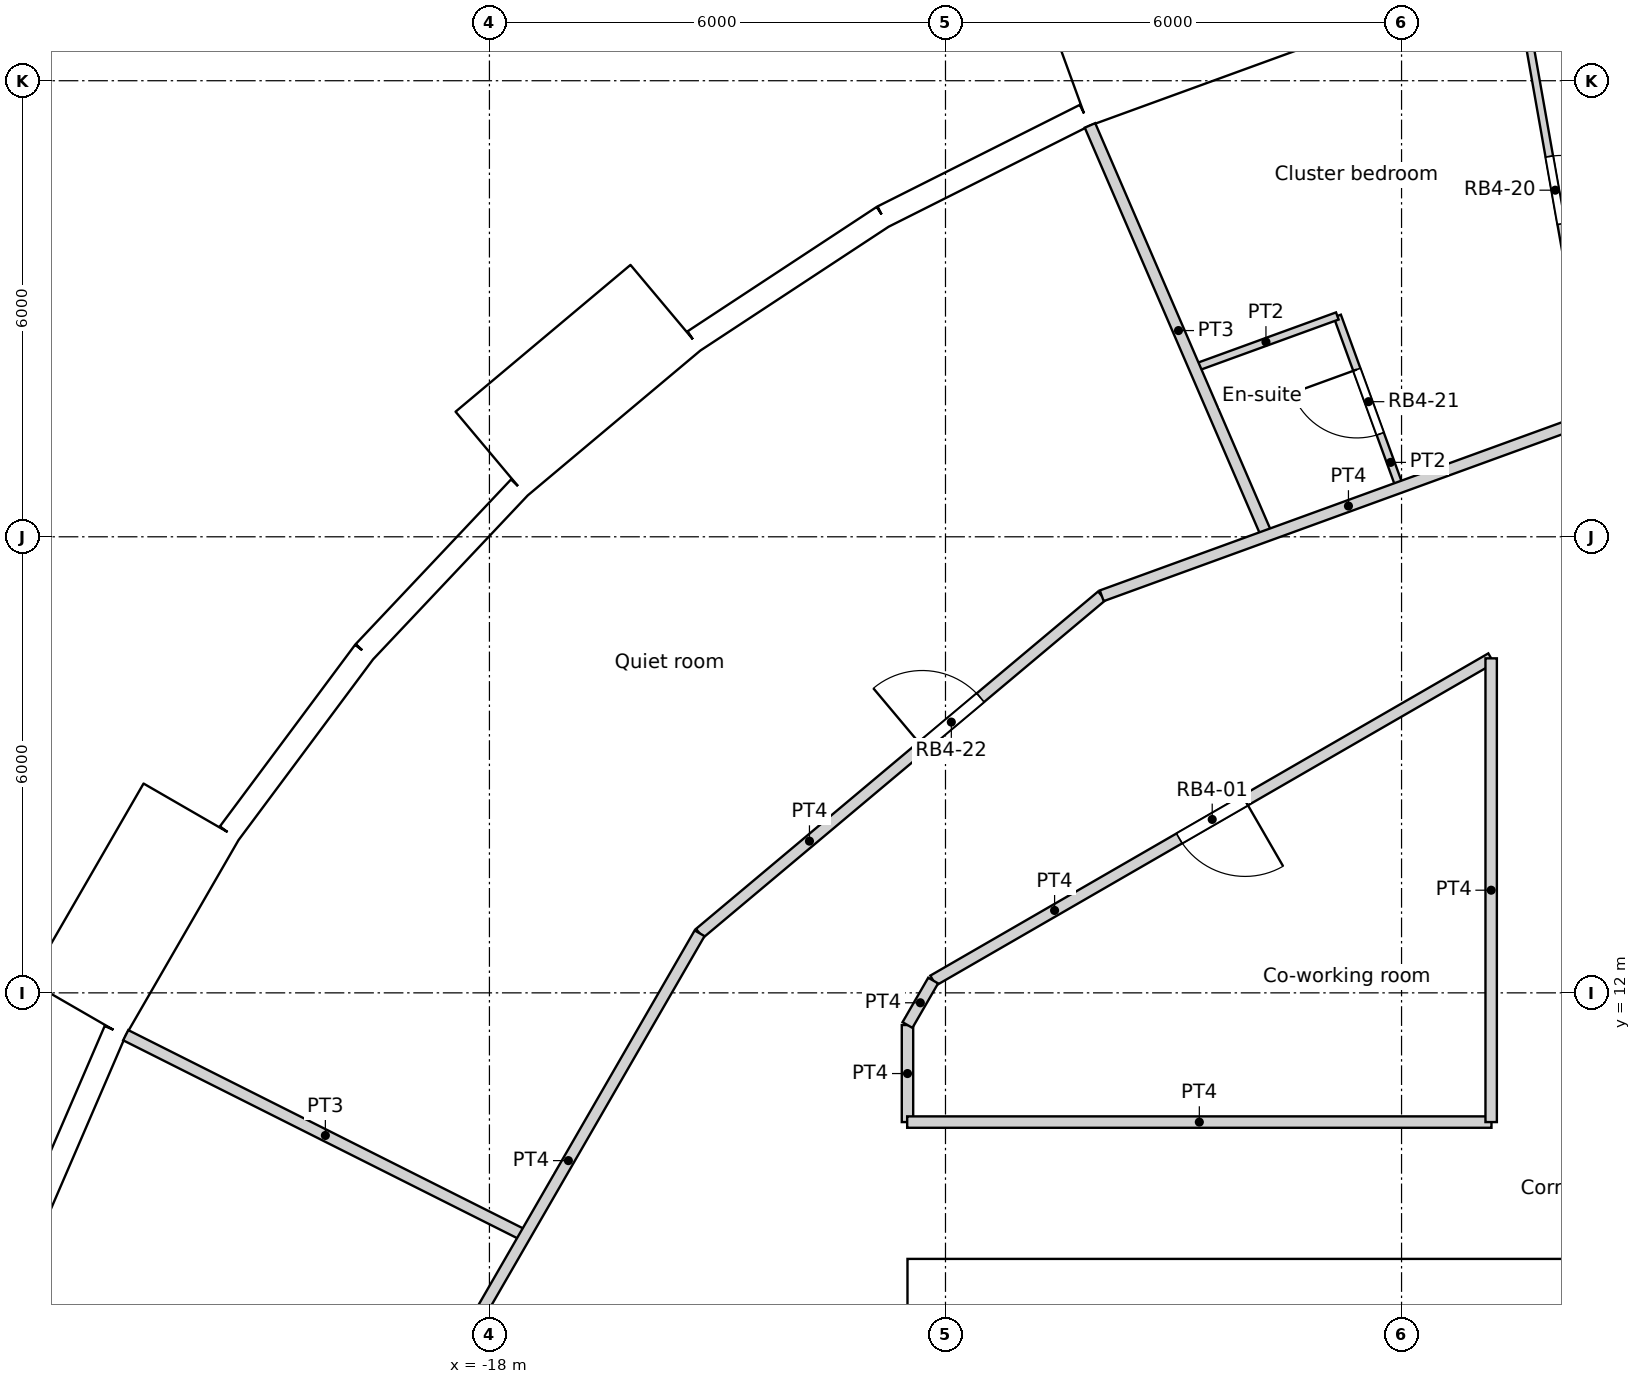
"""IFC4 building model, lengths in metres.
Left out: names, types, materials, properties, quantities, classifications, styles, units other than length and angle.
Written with IfcOpenShell. Run it as: python <this file> out.ifc"""

import sys

from ifc_helpers import new_model, si_unit, direction, frame, frame_2d, origin, origin_2d, place, context, subcontext, project, spatial, rectangle, circle, extrude, element, fill, save


model = new_model("IFC4")
c1 = context("Model", 3, precision=1e-05, world=origin(), true_north=direction((0.0, 1.0)))
c2 = subcontext(c1, "Body", "Model", "MODEL_VIEW")
j1 = project(units=[si_unit("LENGTHUNIT", "METRE"), si_unit("PLANEANGLEUNIT", "RADIAN")], contexts=[c1])
p1 = place(None, origin())
s1 = spatial("IfcSite", under=j1, at=p1, CompositionType="ELEMENT")
p2 = place(p1, origin())
s2 = spatial("IfcBuilding", under=s1, at=p2, CompositionType="ELEMENT")
p3 = place(p2, frame((0.0, 0.0, 158.4)))
s3 = spatial("IfcBuildingStorey", under=s2, at=p3, CompositionType="ELEMENT", Elevation=158.4)
for number, where, z_axis, x_axis in (
    (1, (-7.04, 23.516, 0.0), (0.0, 0.0, 1.0), (1.0, 0.0, 0.0)),
    (2, (-12.274, 21.259, 0.0), (0.0, 0.0, 1.0), (1.0, 0.0, 0.0)),
    (3, (-16.846, 17.855, 0.0), (0.0, 0.0, 1.0), (1.0, 0.0, 0.0)),
    (4, (-20.509, 13.489, 0.0), (0.0, 0.0, 1.0), (1.0, 0.0, 0.0)),
    (5, (-23.067, 8.396, 0.0), (0.0, 0.0, 1.0), (1.0, 0.0, 0.0)),
):
    element("IfcColumn", number, at=place(p3, frame(where, z_axis=z_axis, x_axis=x_axis)), inside=s3, PredefinedType="COLUMN", context=c2, shape_type="SweptSolid", body=[
        extrude(circle(Radius=0.6, at=origin_2d()), origin(), (0.0, 0.0, 1.0), 3.6),
    ])
for number, where, z_axis, x_axis in (
    (6, (-4.188, 18.35, 0.0), (0.0, 0.0, 1.0), (1.0, 0.0, 0.0)),
    (7, (-9.411, 16.301, 0.0), (0.0, 0.0, 1.0), (1.0, 0.0, 0.0)),
    (8, (-13.798, 12.802, 0.0), (0.0, 0.0, 1.0), (1.0, 0.0, 0.0)),
    (9, (-16.958, 8.167, 0.0), (0.0, 0.0, 1.0), (1.0, 0.0, 0.0)),
):
    element("IfcColumn", number, at=place(p3, frame(where, z_axis=z_axis, x_axis=x_axis)), inside=s3, PredefinedType="COLUMN", context=c2, shape_type="SweptSolid", body=[
        extrude(circle(Radius=0.65, at=origin_2d()), origin(), (0.0, 0.0, 1.0), 3.6),
    ])
p4 = place(p3, frame((-7.544, 25.113, -0.3), z_axis=(0.0, 0.0, 1.0), x_axis=(-0.939686455819, -0.342037080957, 0.0)))
e10 = element("IfcWall", 10, at=p4, inside=s3, PredefinedType="ELEMENTEDWALL", context=c2, shape_type="SweptSolid", body=[
    extrude(rectangle(XDim=3.0, YDim=1.45, at=frame_2d((1.5, 0.0))), origin(), (0.0, 0.0, 1.0), 3.6),
])
p5 = place(p4, frame((1.5, 0.0, 1.85)))
e11 = element("IfcOpeningElement", 11, at=p5, cuts=e10, PredefinedType="OPENING", context=c2, shape_type="SweptSolid", body=[
    extrude(circle(Radius=0.9, at=origin_2d()), frame((0.0, 0.735, 0.0), z_axis=(0.0, -1.0, 0.0), x_axis=(1.0, 0.0, 0.0)), (0.0, 0.0, 1.0), 1.47),
])
p6 = place(p3, frame((-10.167, 23.546, 0.0), z_axis=(0.0, 0.0, 1.0), x_axis=(-0.893637442555, -0.448789618045, 0.0)))
e12 = element("IfcWall", 12, at=p6, inside=s3, PredefinedType="SOLIDWALL", context=c2, shape_type="SweptSolid", body=[
    extrude(rectangle(XDim=2.973, YDim=0.3, at=frame_2d((1.486, 0.0))), origin(), (0.0, 0.0, 1.0), 3.3),
])
p7 = place(p6, frame((1.486, 0.0, 1.55)))
e13 = element("IfcOpeningElement", 13, at=p7, cuts=e12, PredefinedType="OPENING", context=c2, shape_type="SweptSolid", body=[
    extrude(circle(Radius=0.9, at=origin_2d()), frame((0.0, 0.16, 0.0), z_axis=(0.0, -1.0, 0.0), x_axis=(1.0, 0.0, 0.0)), (0.0, 0.0, 1.0), 0.32),
])
p8 = place(p3, frame((-12.824, 22.211, 0.0), z_axis=(0.0, 0.0, 1.0), x_axis=(-0.835470659512, -0.549535055382, 0.0)))
e14 = element("IfcWall", 14, at=p8, inside=s3, PredefinedType="SOLIDWALL", context=c2, shape_type="SweptSolid", body=[
    extrude(rectangle(XDim=2.973, YDim=0.3, at=frame_2d((1.487, 0.0))), origin(), (0.0, 0.0, 1.0), 3.3),
])
p9 = place(p8, frame((1.486, 0.0, 1.55)))
e15 = element("IfcOpeningElement", 15, at=p9, cuts=e14, PredefinedType="OPENING", context=c2, shape_type="SweptSolid", body=[
    extrude(circle(Radius=0.9, at=origin_2d()), frame((0.0, 0.16, 0.0), z_axis=(0.0, -1.0, 0.0), x_axis=(1.0, 0.0, 0.0)), (0.0, 0.0, 1.0), 0.32),
])
p10 = place(p3, frame((-15.678, 21.019, -0.3), z_axis=(0.0, 0.0, 1.0), x_axis=(-0.766022196139, -0.642814121673, 0.0)))
e16 = element("IfcWall", 16, at=p10, inside=s3, PredefinedType="ELEMENTEDWALL", context=c2, shape_type="SweptSolid", body=[
    extrude(rectangle(XDim=3.0, YDim=1.45, at=frame_2d((1.5, 0.0))), origin(), (0.0, 0.0, 1.0), 3.6),
])
p11 = place(p10, frame((1.5, 0.0, 1.85)))
e17 = element("IfcOpeningElement", 17, at=p11, cuts=e16, PredefinedType="OPENING", context=c2, shape_type="SweptSolid", body=[
    extrude(circle(Radius=0.9, at=origin_2d()), frame((0.0, 0.735, 0.0), z_axis=(0.0, -1.0, 0.0), x_axis=(1.0, 0.0, 0.0)), (0.0, 0.0, 1.0), 1.47),
])
p12 = place(p3, frame((-17.607, 18.648, 0.0), z_axis=(0.0, 0.0, 1.0), x_axis=(-0.686235184166, -0.727379730273, 0.0)))
e18 = element("IfcWall", 18, at=p12, inside=s3, PredefinedType="SOLIDWALL", context=c2, shape_type="SweptSolid", body=[
    extrude(rectangle(XDim=2.973, YDim=0.3, at=frame_2d((1.486, 0.0))), origin(), (0.0, 0.0, 1.0), 3.3),
])
p13 = place(p12, frame((1.486, 0.0, 1.55)))
e19 = element("IfcOpeningElement", 19, at=p13, cuts=e18, PredefinedType="OPENING", context=c2, shape_type="SweptSolid", body=[
    extrude(circle(Radius=0.9, at=origin_2d()), frame((0.0, 0.16, 0.0), z_axis=(0.0, -1.0, 0.0), x_axis=(1.0, 0.0, 0.0)), (0.0, 0.0, 1.0), 0.32),
])
p14 = place(p3, frame((-19.647, 16.486, 0.0), z_axis=(0.0, 0.0, 1.0), x_axis=(-0.597197580538, -0.80209416517, 0.0)))
e20 = element("IfcWall", 20, at=p14, inside=s3, PredefinedType="SOLIDWALL", context=c2, shape_type="SweptSolid", body=[
    extrude(rectangle(XDim=2.973, YDim=0.3, at=frame_2d((1.486, 0.0))), origin(), (0.0, 0.0, 1.0), 3.3),
])
p15 = place(p14, frame((1.486, 0.0, 1.55)))
e21 = element("IfcOpeningElement", 21, at=p15, cuts=e20, PredefinedType="OPENING", context=c2, shape_type="SweptSolid", body=[
    extrude(circle(Radius=0.9, at=origin_2d()), frame((0.0, 0.16, 0.0), z_axis=(0.0, -1.0, 0.0), x_axis=(1.0, 0.0, 0.0)), (0.0, 0.0, 1.0), 0.32),
])
p16 = place(p3, frame((-21.922, 14.389, -0.3), z_axis=(0.0, 0.0, 1.0), x_axis=(-0.499990139034, -0.866031096941, 0.0)))
e22 = element("IfcWall", 22, at=p16, inside=s3, PredefinedType="ELEMENTEDWALL", context=c2, shape_type="SweptSolid", body=[
    extrude(rectangle(XDim=3.0, YDim=1.45, at=frame_2d((1.5, 0.0))), origin(), (0.0, 0.0, 1.0), 3.6),
])
p17 = place(p16, frame((1.5, 0.0, 1.85)))
e23 = element("IfcOpeningElement", 23, at=p17, cuts=e22, PredefinedType="OPENING", context=c2, shape_type="SweptSolid", body=[
    extrude(circle(Radius=0.9, at=origin_2d()), frame((0.0, 0.735, 0.0), z_axis=(0.0, -1.0, 0.0), x_axis=(1.0, 0.0, 0.0)), (0.0, 0.0, 1.0), 1.47),
])
p18 = place(p3, frame((-22.923, 11.502, 0.0), z_axis=(0.0, 0.0, 1.0), x_axis=(-0.396148129016, -0.918186614952, 0.0)))
e24 = element("IfcWall", 24, at=p18, inside=s3, PredefinedType="SOLIDWALL", context=c2, shape_type="SweptSolid", body=[
    extrude(rectangle(XDim=2.973, YDim=0.3, at=frame_2d((1.486, 0.0))), origin(), (0.0, 0.0, 1.0), 3.3),
])
p19 = place(p18, frame((1.486, 0.0, 1.55)))
e25 = element("IfcOpeningElement", 25, at=p19, cuts=e24, PredefinedType="OPENING", context=c2, shape_type="SweptSolid", body=[
    extrude(circle(Radius=0.9, at=origin_2d()), frame((0.0, 0.16, 0.0), z_axis=(0.0, -1.0, 0.0), x_axis=(1.0, 0.0, 0.0)), (0.0, 0.0, 1.0), 0.32),
])
p20 = place(p3, frame((-12.5, 8.05, 0.0), z_axis=(0.0, 0.0, 1.0), x_axis=(1.0, 0.0, 0.0)))
e26 = element("IfcWall", 26, at=p20, inside=s3, PredefinedType="SOLIDWALL", context=c2, shape_type="SweptSolid", body=[
    extrude(rectangle(XDim=25.0, YDim=0.9, at=frame_2d((12.5, 0.0))), origin(), (0.0, 0.0, 1.0), 3.6),
])
p21 = place(p20, frame((8.3, 0.0, 0.0)))
e27 = element("IfcOpeningElement", 27, at=p21, cuts=e26, PredefinedType="OPENING", context=c2, shape_type="SweptSolid", body=[
    extrude(rectangle(XDim=1.8, YDim=2.1, at=frame_2d((0.9, 1.05))), frame((0.0, 0.45, 0.0), z_axis=(0.0, -1.0, 0.0), x_axis=(1.0, 0.0, 0.0)), (0.0, 0.0, 1.0), 0.9),
])
p22 = place(p3, frame((-12.504, 10.3, 0.0), z_axis=(0.0, 0.0, 1.0), x_axis=(1.0, 0.0, 0.0)))
e28 = element("IfcWall", 28, at=p22, inside=s3, PredefinedType="PARTITIONING", context=c2, shape_type="SweptSolid", body=[
    extrude(rectangle(XDim=7.687, YDim=0.15, at=frame_2d((3.844, 0.0))), origin(), (0.0, 0.0, 1.0), 3.3),
])
p23 = place(p3, frame((-4.821, 10.3, 0.0), z_axis=(0.0, 0.0, 1.0), x_axis=(0.0, 1.0, 0.0)))
e29 = element("IfcWall", 29, at=p23, inside=s3, PredefinedType="PARTITIONING", context=c2, shape_type="SweptSolid", body=[
    extrude(rectangle(XDim=6.101, YDim=0.15, at=frame_2d((3.05, 0.0))), origin(), (0.0, 0.0, 1.0), 3.3),
])
p24 = place(p3, frame((-12.162, 12.162, 0.0), z_axis=(0.0, 0.0, 1.0), x_axis=(0.866004766557, 0.500035743023, 0.0)))
e30 = element("IfcWall", 30, at=p24, inside=s3, PredefinedType="PARTITIONING", context=c2, shape_type="SweptSolid", body=[
    extrude(rectangle(XDim=8.477, YDim=0.15, at=frame_2d((4.239, 0.0))), origin(), (0.0, 0.0, 1.0), 3.3),
])
p25 = place(p24, frame((3.739, 0.0, 0.0)))
e31 = element("IfcOpeningElement", 31, at=p25, cuts=e30, PredefinedType="OPENING", context=c2, shape_type="SweptSolid", body=[
    extrude(rectangle(XDim=1.0, YDim=2.04, at=frame_2d((0.5, 1.02))), frame((0.0, 0.075, 0.0), z_axis=(0.0, -1.0, 0.0), x_axis=(1.0, 0.0, 0.0)), (0.0, 0.0, 1.0), 0.15),
])
p26 = place(p3, frame((-9.944, 17.224, 0.0), z_axis=(0.0, 0.0, 1.0), x_axis=(0.939722202107, 0.341938858377, 0.0)))
e32 = element("IfcWall", 32, at=p26, inside=s3, PredefinedType="PARTITIONING", context=c2, shape_type="SweptSolid", body=[
    extrude(rectangle(XDim=6.908, YDim=0.15, at=frame_2d((3.454, 0.0))), origin(), (0.0, 0.0, 1.0), 3.3),
])
p27 = place(p3, frame((-15.235, 12.784, 0.0), z_axis=(0.0, 0.0, 1.0), x_axis=(0.766064078986, 0.642764207845, 0.0)))
e33 = element("IfcWall", 33, at=p27, inside=s3, PredefinedType="PARTITIONING", context=c2, shape_type="SweptSolid", body=[
    extrude(rectangle(XDim=6.906, YDim=0.15, at=frame_2d((3.453, 0.0))), origin(), (0.0, 0.0, 1.0), 3.3),
])
p28 = place(p27, frame((3.823, 0.0, 0.0)))
e34 = element("IfcOpeningElement", 34, at=p28, cuts=e33, PredefinedType="OPENING", context=c2, shape_type="SweptSolid", body=[
    extrude(rectangle(XDim=1.0, YDim=2.04, at=frame_2d((0.5, 1.02))), frame((0.0, 0.075, 0.0), z_axis=(0.0, -1.0, 0.0), x_axis=(1.0, 0.0, 0.0)), (0.0, 0.0, 1.0), 0.15),
])
p29 = place(p3, frame((-12.5, 11.577, 0.0), z_axis=(0.0, 0.0, 1.0), x_axis=(0.500024767483, 0.866011103799, 0.0)))
e35 = element("IfcWall", 35, at=p29, inside=s3, PredefinedType="PARTITIONING", context=c2, shape_type="SweptSolid", body=[
    extrude(rectangle(XDim=0.676, YDim=0.15, at=frame_2d((0.338, 0.0))), origin(), (0.0, 0.0, 1.0), 3.3),
])
p30 = place(p3, frame((-12.5, 10.3, 0.0), z_axis=(0.0, 0.0, 1.0), x_axis=(0.0, 1.0, 0.0)))
e36 = element("IfcWall", 36, at=p30, inside=s3, PredefinedType="PARTITIONING", context=c2, shape_type="SweptSolid", body=[
    extrude(rectangle(XDim=1.277, YDim=0.15, at=frame_2d((0.638, 0.0))), origin(), (0.0, 0.0, 1.0), 3.3),
])
p31 = place(p3, frame((-18.688, 6.802, 0.0), z_axis=(0.0, 0.0, 1.0), x_axis=(0.499914202267, 0.866074933462, 0.0)))
e37 = element("IfcWall", 37, at=p31, inside=s3, PredefinedType="PARTITIONING", context=c2, shape_type="SweptSolid", body=[
    extrude(rectangle(XDim=6.907, YDim=0.15, at=frame_2d((3.454, 0.0))), origin(), (0.0, 0.0, 1.0), 3.3),
])
p32 = place(p3, frame((-4.428, 25.11, 0.0), z_axis=(0.0, 0.0, 1.0), x_axis=(0.17382754149, -0.984776109489, 0.0)))
e38 = element("IfcWall", 38, at=p32, inside=s3, PredefinedType="PARTITIONING", context=c2, shape_type="SweptSolid", body=[
    extrude(rectangle(XDim=5.61, YDim=0.1, at=frame_2d((2.805, 0.0))), origin(), (0.0, 0.0, 1.0), 3.3),
])
p33 = place(p32, frame((2.139, 0.0, 0.0)))
e39 = element("IfcOpeningElement", 39, at=p33, cuts=e38, PredefinedType="OPENING", context=c2, shape_type="SweptSolid", body=[
    extrude(rectangle(XDim=0.9, YDim=2.1, at=frame_2d((0.45, 1.05))), frame((0.0, 0.05, 0.0), z_axis=(0.0, -1.0, 0.0), x_axis=(1.0, 0.0, 0.0)), (0.0, 0.0, 1.0), 0.1),
])
p34 = place(p3, frame((-6.845, 20.905, 0.0), z_axis=(0.0, 0.0, 1.0), x_axis=(0.342110593602, -0.939659694648, 0.0)))
e40 = element("IfcWall", 40, at=p34, inside=s3, PredefinedType="PARTITIONING", context=c2, shape_type="SweptSolid", body=[
    extrude(rectangle(XDim=2.4, YDim=0.1, at=frame_2d((1.2, 0.0))), origin(), (0.0, 0.0, 1.0), 3.3),
])
p35 = place(p34, frame((0.75, 0.0, 0.0)))
e41 = element("IfcOpeningElement", 41, at=p35, cuts=e40, PredefinedType="OPENING", context=c2, shape_type="SweptSolid", body=[
    extrude(rectangle(XDim=0.9, YDim=2.04, at=frame_2d((0.45, 1.02))), frame((0.0, 0.05, 0.0), z_axis=(0.0, -1.0, 0.0), x_axis=(1.0, 0.0, 0.0)), (0.0, 0.0, 1.0), 0.1),
])
p36 = place(p3, frame((-8.723, 20.222, 0.0), z_axis=(0.0, 0.0, 1.0), x_axis=(0.939757747305, 0.341841156651, 0.0)))
e42 = element("IfcWall", 42, at=p36, inside=s3, PredefinedType="PARTITIONING", context=c2, shape_type="SweptSolid", body=[
    extrude(rectangle(XDim=1.998, YDim=0.1, at=frame_2d((0.999, 0.0))), origin(), (0.0, 0.0, 1.0), 3.3),
])
p37 = place(p3, frame((-10.099, 23.412, 0.0), z_axis=(0.0, 0.0, 1.0), x_axis=(0.396103469133, -0.918205882001, 0.0)))
e43 = element("IfcWall", 43, at=p37, inside=s3, PredefinedType="PARTITIONING", context=c2, shape_type="SweptSolid", body=[
    extrude(rectangle(XDim=5.879, YDim=0.15, at=frame_2d((2.939, 0.0))), origin(), (0.0, 0.0, 1.0), 3.3),
])
p38 = place(p3, frame((-22.785, 11.443, 0.0), z_axis=(0.0, 0.0, 1.0), x_axis=(0.893628331628, -0.448807759415, 0.0)))
e44 = element("IfcWall", 44, at=p38, inside=s3, PredefinedType="PARTITIONING", context=c2, shape_type="SweptSolid", body=[
    extrude(rectangle(XDim=5.878, YDim=0.15, at=frame_2d((2.939, 0.0))), origin(), (0.0, 0.0, 1.0), 3.3),
])
p39 = place(p5, origin())
e45 = element("IfcWindow", 45, at=p39, inside=s3, PartitioningType="SINGLE_PANEL", PredefinedType="WINDOW", context=c2, shape_type="SweptSolid", body=[
    extrude(circle(Radius=0.9, at=origin_2d()), frame((0.0, 0.695, 0.0), z_axis=(0.0, -1.0, 0.0), x_axis=(1.0, 0.0, 0.0)), (0.0, 0.0, 1.0), 0.1),
])
fill(e11, e45)
p40 = place(p7, origin())
e46 = element("IfcWindow", 46, at=p40, inside=s3, PartitioningType="SINGLE_PANEL", PredefinedType="WINDOW", context=c2, shape_type="SweptSolid", body=[
    extrude(circle(Radius=0.9, at=origin_2d()), frame((0.0, 0.12, 0.0), z_axis=(0.0, -1.0, 0.0), x_axis=(1.0, 0.0, 0.0)), (0.0, 0.0, 1.0), 0.1),
])
fill(e13, e46)
p41 = place(p9, origin())
e47 = element("IfcWindow", 47, at=p41, inside=s3, PartitioningType="SINGLE_PANEL", PredefinedType="WINDOW", context=c2, shape_type="SweptSolid", body=[
    extrude(circle(Radius=0.9, at=origin_2d()), frame((0.0, 0.12, 0.0), z_axis=(0.0, -1.0, 0.0), x_axis=(1.0, 0.0, 0.0)), (0.0, 0.0, 1.0), 0.1),
])
fill(e15, e47)
p42 = place(p11, origin())
e48 = element("IfcWindow", 48, at=p42, inside=s3, PartitioningType="SINGLE_PANEL", PredefinedType="WINDOW", context=c2, shape_type="SweptSolid", body=[
    extrude(circle(Radius=0.9, at=origin_2d()), frame((0.0, 0.695, 0.0), z_axis=(0.0, -1.0, 0.0), x_axis=(1.0, 0.0, 0.0)), (0.0, 0.0, 1.0), 0.1),
])
fill(e17, e48)
p43 = place(p13, origin())
e49 = element("IfcWindow", 49, at=p43, inside=s3, PartitioningType="SINGLE_PANEL", PredefinedType="WINDOW", context=c2, shape_type="SweptSolid", body=[
    extrude(circle(Radius=0.9, at=origin_2d()), frame((0.0, 0.12, 0.0), z_axis=(0.0, -1.0, 0.0), x_axis=(1.0, 0.0, 0.0)), (0.0, 0.0, 1.0), 0.1),
])
fill(e19, e49)
p44 = place(p15, origin())
e50 = element("IfcWindow", 50, at=p44, inside=s3, PartitioningType="SINGLE_PANEL", PredefinedType="WINDOW", context=c2, shape_type="SweptSolid", body=[
    extrude(circle(Radius=0.9, at=origin_2d()), frame((0.0, 0.12, 0.0), z_axis=(0.0, -1.0, 0.0), x_axis=(1.0, 0.0, 0.0)), (0.0, 0.0, 1.0), 0.1),
])
fill(e21, e50)
p45 = place(p17, origin())
e51 = element("IfcWindow", 51, at=p45, inside=s3, PartitioningType="SINGLE_PANEL", PredefinedType="WINDOW", context=c2, shape_type="SweptSolid", body=[
    extrude(circle(Radius=0.9, at=origin_2d()), frame((0.0, 0.695, 0.0), z_axis=(0.0, -1.0, 0.0), x_axis=(1.0, 0.0, 0.0)), (0.0, 0.0, 1.0), 0.1),
])
fill(e23, e51)
p46 = place(p19, origin())
e52 = element("IfcWindow", 52, at=p46, inside=s3, PartitioningType="SINGLE_PANEL", PredefinedType="WINDOW", context=c2, shape_type="SweptSolid", body=[
    extrude(circle(Radius=0.9, at=origin_2d()), frame((0.0, 0.12, 0.0), z_axis=(0.0, -1.0, 0.0), x_axis=(1.0, 0.0, 0.0)), (0.0, 0.0, 1.0), 0.1),
])
fill(e25, e52)
p47 = place(p21, origin())
e53 = element("IfcDoor", 53, at=p47, inside=s3, OperationType="DOUBLE_DOOR_SINGLE_SWING", PredefinedType="DOOR", context=c2, shape_type="SweptSolid", body=[
    extrude(rectangle(XDim=1.8, YDim=2.1, at=frame_2d((0.9, 1.05))), frame((0.0, 0.025, 0.0), z_axis=(0.0, -1.0, 0.0), x_axis=(1.0, 0.0, 0.0)), (0.0, 0.0, 1.0), 0.05),
])
fill(e27, e53)
p48 = place(p25, origin())
e54 = element("IfcDoor", 54, at=p48, inside=s3, OperationType="SINGLE_SWING_LEFT", PredefinedType="DOOR", context=c2, shape_type="SweptSolid", body=[
    extrude(rectangle(XDim=1.0, YDim=2.04, at=frame_2d((0.5, 1.02))), frame((0.0, 0.025, 0.0), z_axis=(0.0, -1.0, 0.0), x_axis=(1.0, 0.0, 0.0)), (0.0, 0.0, 1.0), 0.05),
])
fill(e31, e54)
p49 = place(p33, origin())
e55 = element("IfcDoor", 55, at=p49, inside=s3, OperationType="SINGLE_SWING_RIGHT", PredefinedType="DOOR", context=c2, shape_type="SweptSolid", body=[
    extrude(rectangle(XDim=0.9, YDim=2.1, at=frame_2d((0.45, 1.05))), frame((0.0, 0.025, 0.0), z_axis=(0.0, -1.0, 0.0), x_axis=(1.0, 0.0, 0.0)), (0.0, 0.0, 1.0), 0.05),
])
fill(e39, e55)
p50 = place(p35, origin())
e56 = element("IfcDoor", 56, at=p50, inside=s3, OperationType="SINGLE_SWING_RIGHT", PredefinedType="DOOR", context=c2, shape_type="SweptSolid", body=[
    extrude(rectangle(XDim=0.9, YDim=2.04, at=frame_2d((0.45, 1.02))), frame((0.0, 0.025, 0.0), z_axis=(0.0, -1.0, 0.0), x_axis=(1.0, 0.0, 0.0)), (0.0, 0.0, 1.0), 0.05),
])
fill(e41, e56)
p51 = place(p28, origin())
e57 = element("IfcDoor", 57, at=p51, inside=s3, OperationType="SINGLE_SWING_LEFT", PredefinedType="DOOR", context=c2, shape_type="SweptSolid", body=[
    extrude(rectangle(XDim=1.0, YDim=2.04, at=frame_2d((0.5, 1.02))), frame((0.0, 0.025, 0.0), z_axis=(0.0, -1.0, 0.0), x_axis=(1.0, 0.0, 0.0)), (0.0, 0.0, 1.0), 0.05),
])
fill(e34, e57)
save(model, sys.argv[1])
